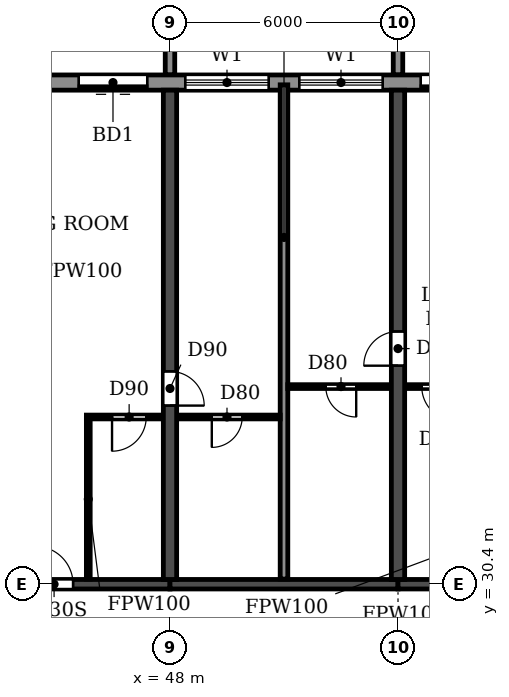
"""IFC4 building model, lengths in metres.
Left out: names, types, materials, properties, quantities, classifications, styles, units other than length and angle.
Written with IfcOpenShell. Run it as: python <this file> out.ifc"""

import sys

from ifc_helpers import new_model, si_unit, direction, frame, frame_2d, origin, place, context, subcontext, project, spatial, polyline, rectangle, outline, extrude, source, transform, mapped, element, fill, save


model = new_model("IFC4")
c1 = context("Model", 3, precision=1e-05, world=origin(), true_north=direction((0.0, 1.0)))
c2 = subcontext(c1, "Body", "Model", "MODEL_VIEW")
j1 = project(units=[si_unit("LENGTHUNIT", "METRE"), si_unit("PLANEANGLEUNIT", "RADIAN")], contexts=[c1])
p1 = place(None, origin())
s1 = spatial("IfcSite", under=j1, at=p1, CompositionType="ELEMENT")
p2 = place(p1, origin())
s2 = spatial("IfcBuilding", under=s1, at=p2, CompositionType="ELEMENT")
p3 = place(p2, frame((0.0, 0.0, 102.6)))
s3 = spatial("IfcBuildingStorey", under=s2, at=p3, CompositionType="ELEMENT", Elevation=102.6)
p4 = place(p3, frame((48.0, 30.525, 0.0), z_axis=(0.0, 0.0, 1.0), x_axis=(0.0, 1.0, 0.0)))
e1 = element("IfcWall", 1, at=p4, inside=s3, PredefinedType="SHEAR", context=c2, shape_type="SweptSolid", body=[
    extrude(rectangle(XDim=12.875, YDim=0.35, at=frame_2d((6.438, 0.0))), origin(), (0.0, 0.0, 1.0), 3.0),
])
p5 = place(p4, frame((4.575, 0.0, 0.0)))
e2 = element("IfcOpeningElement", 2, at=p5, cuts=e1, PredefinedType="OPENING", context=c2, shape_type="SweptSolid", body=[
    extrude(rectangle(XDim=0.9, YDim=2.1, at=frame_2d((0.45, 1.05))), frame((0.0, 0.185, 0.0), z_axis=(0.0, -1.0, 0.0), x_axis=(1.0, 0.0, 0.0)), (0.0, 0.0, 1.0), 0.37),
])
p6 = place(p3, frame((54.0, 30.525, 0.0), z_axis=(0.0, 0.0, 1.0), x_axis=(0.0, 1.0, 0.0)))
e3 = element("IfcWall", 3, at=p6, inside=s3, PredefinedType="SHEAR", context=c2, shape_type="SweptSolid", body=[
    extrude(rectangle(XDim=12.875, YDim=0.35, at=frame_2d((6.438, 0.0))), origin(), (0.0, 0.0, 1.0), 3.0),
])
p7 = place(p6, frame((5.625, 0.0, 0.0)))
e4 = element("IfcOpeningElement", 4, at=p7, cuts=e3, PredefinedType="OPENING", context=c2, shape_type="SweptSolid", body=[
    extrude(rectangle(XDim=0.9, YDim=2.1, at=frame_2d((0.45, 1.05))), frame((0.0, 0.185, 0.0), z_axis=(0.0, -1.0, 0.0), x_axis=(1.0, 0.0, 0.0)), (0.0, 0.0, 1.0), 0.37),
])
p8 = place(p3, frame((42.0, 30.4, 0.0), z_axis=(0.0, 0.0, 1.0), x_axis=(1.0, 0.0, 0.0)))
e5 = element("IfcWall", 5, at=p8, inside=s3, PredefinedType="SHEAR", context=c2, shape_type="SweptSolid", body=[
    extrude(rectangle(XDim=6.0, YDim=0.25, at=frame_2d((3.0, 0.0))), origin(), (0.0, 0.0, 1.0), 2.4),
])
p9 = place(p8, frame((2.45, 0.0, 0.0)))
e6 = element("IfcOpeningElement", 6, at=p9, cuts=e5, PredefinedType="OPENING", context=c2, shape_type="SweptSolid", body=[
    extrude(rectangle(XDim=1.0, YDim=2.1, at=frame_2d((0.5, 1.05))), frame((0.0, 0.135, 0.0), z_axis=(0.0, -1.0, 0.0), x_axis=(1.0, 0.0, 0.0)), (0.0, 0.0, 1.0), 0.27),
])
p10 = place(p3, frame((48.0, 30.4, 0.0), z_axis=(0.0, 0.0, 1.0), x_axis=(1.0, 0.0, 0.0)))
e7 = element("IfcWall", 7, at=p10, inside=s3, PredefinedType="SHEAR", context=c2, shape_type="SweptSolid", body=[
    extrude(rectangle(XDim=6.0, YDim=0.25, at=frame_2d((3.0, 0.0))), origin(), (0.0, 0.0, 1.0), 2.4),
])
p11 = place(p3, frame((54.0, 30.4, 0.0), z_axis=(0.0, 0.0, 1.0), x_axis=(1.0, 0.0, 0.0)))
e8 = element("IfcWall", 8, at=p11, inside=s3, PredefinedType="SHEAR", context=c2, shape_type="SweptSolid", body=[
    extrude(rectangle(XDim=6.0, YDim=0.25, at=frame_2d((3.0, 0.0))), origin(), (0.0, 0.0, 1.0), 2.4),
])
p12 = place(p11, frame((2.55, 0.0, 0.0)))
e9 = element("IfcOpeningElement", 9, at=p12, cuts=e8, PredefinedType="OPENING", context=c2, shape_type="SweptSolid", body=[
    extrude(rectangle(XDim=1.0, YDim=2.1, at=frame_2d((0.5, 1.05))), frame((0.0, 0.135, 0.0), z_axis=(0.0, -1.0, 0.0), x_axis=(1.0, 0.0, 0.0)), (0.0, 0.0, 1.0), 0.27),
])
p13 = place(p3, frame((91.317, 43.6, 0.0), z_axis=(0.0, 0.0, 1.0), x_axis=(-1.0, 0.0, 0.0)))
e10 = element("IfcWall", 10, at=p13, inside=s3, PredefinedType="STANDARD", context=c2, shape_type="SweptSolid", body=[
    extrude(rectangle(XDim=80.634, YDim=0.4, at=frame_2d((40.317, 0.0))), origin(), (0.0, 0.0, 1.0), 3.0),
])
p14 = place(p13, frame((76.717, 0.0, 0.9)))
e11 = element("IfcOpeningElement", 11, at=p14, cuts=e10, PredefinedType="OPENING", context=c2, shape_type="SweptSolid", body=[
    extrude(rectangle(XDim=2.2, YDim=1.5, at=frame_2d((1.1, 0.75))), frame((0.0, 0.21, 0.0), z_axis=(0.0, -1.0, 0.0), x_axis=(1.0, 0.0, 0.0)), (0.0, 0.0, 1.0), 0.42),
])
p15 = place(p13, frame((73.917, 0.0, 0.0)))
e12 = element("IfcOpeningElement", 12, at=p15, cuts=e10, PredefinedType="OPENING", context=c2, shape_type="SweptSolid", body=[
    extrude(rectangle(XDim=1.8, YDim=2.4, at=frame_2d((0.9, 1.2))), frame((0.0, 0.21, 0.0), z_axis=(0.0, -1.0, 0.0), x_axis=(1.0, 0.0, 0.0)), (0.0, 0.0, 1.0), 0.42),
])
p16 = place(p13, frame((70.717, 0.0, 0.9)))
e13 = element("IfcOpeningElement", 13, at=p16, cuts=e10, PredefinedType="OPENING", context=c2, shape_type="SweptSolid", body=[
    extrude(rectangle(XDim=2.2, YDim=1.5, at=frame_2d((1.1, 0.75))), frame((0.0, 0.21, 0.0), z_axis=(0.0, -1.0, 0.0), x_axis=(1.0, 0.0, 0.0)), (0.0, 0.0, 1.0), 0.42),
])
p17 = place(p13, frame((67.717, 0.0, 0.9)))
e14 = element("IfcOpeningElement", 14, at=p17, cuts=e10, PredefinedType="OPENING", context=c2, shape_type="SweptSolid", body=[
    extrude(rectangle(XDim=2.2, YDim=1.5, at=frame_2d((1.1, 0.75))), frame((0.0, 0.21, 0.0), z_axis=(0.0, -1.0, 0.0), x_axis=(1.0, 0.0, 0.0)), (0.0, 0.0, 1.0), 0.42),
])
p18 = place(p13, frame((64.917, 0.0, 0.0)))
e15 = element("IfcOpeningElement", 15, at=p18, cuts=e10, PredefinedType="OPENING", context=c2, shape_type="SweptSolid", body=[
    extrude(rectangle(XDim=1.8, YDim=2.4, at=frame_2d((0.9, 1.2))), frame((0.0, 0.21, 0.0), z_axis=(0.0, -1.0, 0.0), x_axis=(1.0, 0.0, 0.0)), (0.0, 0.0, 1.0), 0.42),
])
p19 = place(p13, frame((61.717, 0.0, 0.9)))
e16 = element("IfcOpeningElement", 16, at=p19, cuts=e10, PredefinedType="OPENING", context=c2, shape_type="SweptSolid", body=[
    extrude(rectangle(XDim=2.2, YDim=1.5, at=frame_2d((1.1, 0.75))), frame((0.0, 0.21, 0.0), z_axis=(0.0, -1.0, 0.0), x_axis=(1.0, 0.0, 0.0)), (0.0, 0.0, 1.0), 0.42),
])
p20 = place(p13, frame((58.717, 0.0, 0.9)))
e17 = element("IfcOpeningElement", 17, at=p20, cuts=e10, PredefinedType="OPENING", context=c2, shape_type="SweptSolid", body=[
    extrude(rectangle(XDim=2.2, YDim=1.5, at=frame_2d((1.1, 0.75))), frame((0.0, 0.21, 0.0), z_axis=(0.0, -1.0, 0.0), x_axis=(1.0, 0.0, 0.0)), (0.0, 0.0, 1.0), 0.42),
])
p21 = place(p13, frame((55.717, 0.0, 0.9)))
e18 = element("IfcOpeningElement", 18, at=p21, cuts=e10, PredefinedType="OPENING", context=c2, shape_type="SweptSolid", body=[
    extrude(rectangle(XDim=2.2, YDim=1.5, at=frame_2d((1.1, 0.75))), frame((0.0, 0.21, 0.0), z_axis=(0.0, -1.0, 0.0), x_axis=(1.0, 0.0, 0.0)), (0.0, 0.0, 1.0), 0.42),
])
p22 = place(p13, frame((52.717, 0.0, 0.9)))
e19 = element("IfcOpeningElement", 19, at=p22, cuts=e10, PredefinedType="OPENING", context=c2, shape_type="SweptSolid", body=[
    extrude(rectangle(XDim=2.2, YDim=1.5, at=frame_2d((1.1, 0.75))), frame((0.0, 0.21, 0.0), z_axis=(0.0, -1.0, 0.0), x_axis=(1.0, 0.0, 0.0)), (0.0, 0.0, 1.0), 0.42),
])
p23 = place(p13, frame((49.917, 0.0, 0.0)))
e20 = element("IfcOpeningElement", 20, at=p23, cuts=e10, PredefinedType="OPENING", context=c2, shape_type="SweptSolid", body=[
    extrude(rectangle(XDim=1.8, YDim=2.4, at=frame_2d((0.9, 1.2))), frame((0.0, 0.21, 0.0), z_axis=(0.0, -1.0, 0.0), x_axis=(1.0, 0.0, 0.0)), (0.0, 0.0, 1.0), 0.42),
])
p24 = place(p13, frame((46.717, 0.0, 0.9)))
e21 = element("IfcOpeningElement", 21, at=p24, cuts=e10, PredefinedType="OPENING", context=c2, shape_type="SweptSolid", body=[
    extrude(rectangle(XDim=2.2, YDim=1.5, at=frame_2d((1.1, 0.75))), frame((0.0, 0.21, 0.0), z_axis=(0.0, -1.0, 0.0), x_axis=(1.0, 0.0, 0.0)), (0.0, 0.0, 1.0), 0.42),
])
p25 = place(p13, frame((43.917, 0.0, 0.0)))
e22 = element("IfcOpeningElement", 22, at=p25, cuts=e10, PredefinedType="OPENING", context=c2, shape_type="SweptSolid", body=[
    extrude(rectangle(XDim=1.8, YDim=2.4, at=frame_2d((0.9, 1.2))), frame((0.0, 0.21, 0.0), z_axis=(0.0, -1.0, 0.0), x_axis=(1.0, 0.0, 0.0)), (0.0, 0.0, 1.0), 0.42),
])
p26 = place(p13, frame((40.717, 0.0, 0.9)))
e23 = element("IfcOpeningElement", 23, at=p26, cuts=e10, PredefinedType="OPENING", context=c2, shape_type="SweptSolid", body=[
    extrude(rectangle(XDim=2.2, YDim=1.5, at=frame_2d((1.1, 0.75))), frame((0.0, 0.21, 0.0), z_axis=(0.0, -1.0, 0.0), x_axis=(1.0, 0.0, 0.0)), (0.0, 0.0, 1.0), 0.42),
])
p27 = place(p13, frame((37.717, 0.0, 0.9)))
e24 = element("IfcOpeningElement", 24, at=p27, cuts=e10, PredefinedType="OPENING", context=c2, shape_type="SweptSolid", body=[
    extrude(rectangle(XDim=2.2, YDim=1.5, at=frame_2d((1.1, 0.75))), frame((0.0, 0.21, 0.0), z_axis=(0.0, -1.0, 0.0), x_axis=(1.0, 0.0, 0.0)), (0.0, 0.0, 1.0), 0.42),
])
p28 = place(p13, frame((34.917, 0.0, 0.0)))
e25 = element("IfcOpeningElement", 25, at=p28, cuts=e10, PredefinedType="OPENING", context=c2, shape_type="SweptSolid", body=[
    extrude(rectangle(XDim=1.8, YDim=2.4, at=frame_2d((0.9, 1.2))), frame((0.0, 0.21, 0.0), z_axis=(0.0, -1.0, 0.0), x_axis=(1.0, 0.0, 0.0)), (0.0, 0.0, 1.0), 0.42),
])
p29 = place(p13, frame((31.717, 0.0, 0.9)))
e26 = element("IfcOpeningElement", 26, at=p29, cuts=e10, PredefinedType="OPENING", context=c2, shape_type="SweptSolid", body=[
    extrude(rectangle(XDim=2.2, YDim=1.5, at=frame_2d((1.1, 0.75))), frame((0.0, 0.21, 0.0), z_axis=(0.0, -1.0, 0.0), x_axis=(1.0, 0.0, 0.0)), (0.0, 0.0, 1.0), 0.42),
])
p30 = place(p13, frame((28.717, 0.0, 0.9)))
e27 = element("IfcOpeningElement", 27, at=p30, cuts=e10, PredefinedType="OPENING", context=c2, shape_type="SweptSolid", body=[
    extrude(rectangle(XDim=2.2, YDim=1.5, at=frame_2d((1.1, 0.75))), frame((0.0, 0.21, 0.0), z_axis=(0.0, -1.0, 0.0), x_axis=(1.0, 0.0, 0.0)), (0.0, 0.0, 1.0), 0.42),
])
p31 = place(p13, frame((25.917, 0.0, 0.0)))
e28 = element("IfcOpeningElement", 28, at=p31, cuts=e10, PredefinedType="OPENING", context=c2, shape_type="SweptSolid", body=[
    extrude(rectangle(XDim=1.8, YDim=2.4, at=frame_2d((0.9, 1.2))), frame((0.0, 0.21, 0.0), z_axis=(0.0, -1.0, 0.0), x_axis=(1.0, 0.0, 0.0)), (0.0, 0.0, 1.0), 0.42),
])
p32 = place(p13, frame((22.717, 0.0, 0.9)))
e29 = element("IfcOpeningElement", 29, at=p32, cuts=e10, PredefinedType="OPENING", context=c2, shape_type="SweptSolid", body=[
    extrude(rectangle(XDim=2.2, YDim=1.5, at=frame_2d((1.1, 0.75))), frame((0.0, 0.21, 0.0), z_axis=(0.0, -1.0, 0.0), x_axis=(1.0, 0.0, 0.0)), (0.0, 0.0, 1.0), 0.42),
])
p33 = place(p13, frame((19.717, 0.0, 0.9)))
e30 = element("IfcOpeningElement", 30, at=p33, cuts=e10, PredefinedType="OPENING", context=c2, shape_type="SweptSolid", body=[
    extrude(rectangle(XDim=2.2, YDim=1.5, at=frame_2d((1.1, 0.75))), frame((0.0, 0.21, 0.0), z_axis=(0.0, -1.0, 0.0), x_axis=(1.0, 0.0, 0.0)), (0.0, 0.0, 1.0), 0.42),
])
p34 = place(p13, frame((16.917, 0.0, 0.0)))
e31 = element("IfcOpeningElement", 31, at=p34, cuts=e10, PredefinedType="OPENING", context=c2, shape_type="SweptSolid", body=[
    extrude(rectangle(XDim=1.8, YDim=2.4, at=frame_2d((0.9, 1.2))), frame((0.0, 0.21, 0.0), z_axis=(0.0, -1.0, 0.0), x_axis=(1.0, 0.0, 0.0)), (0.0, 0.0, 1.0), 0.42),
])
p35 = place(p13, frame((13.717, 0.0, 0.9)))
e32 = element("IfcOpeningElement", 32, at=p35, cuts=e10, PredefinedType="OPENING", context=c2, shape_type="SweptSolid", body=[
    extrude(rectangle(XDim=2.2, YDim=1.5, at=frame_2d((1.1, 0.75))), frame((0.0, 0.21, 0.0), z_axis=(0.0, -1.0, 0.0), x_axis=(1.0, 0.0, 0.0)), (0.0, 0.0, 1.0), 0.42),
])
p36 = place(p13, frame((10.917, 0.0, 0.0)))
e33 = element("IfcOpeningElement", 33, at=p36, cuts=e10, PredefinedType="OPENING", context=c2, shape_type="SweptSolid", body=[
    extrude(rectangle(XDim=1.8, YDim=2.4, at=frame_2d((0.9, 1.2))), frame((0.0, 0.21, 0.0), z_axis=(0.0, -1.0, 0.0), x_axis=(1.0, 0.0, 0.0)), (0.0, 0.0, 1.0), 0.42),
])
p37 = place(p13, frame((7.717, 0.0, 0.9)))
e34 = element("IfcOpeningElement", 34, at=p37, cuts=e10, PredefinedType="OPENING", context=c2, shape_type="SweptSolid", body=[
    extrude(rectangle(XDim=2.2, YDim=1.5, at=frame_2d((1.1, 0.75))), frame((0.0, 0.21, 0.0), z_axis=(0.0, -1.0, 0.0), x_axis=(1.0, 0.0, 0.0)), (0.0, 0.0, 1.0), 0.42),
])
p38 = place(p13, frame((4.717, 0.0, 0.9)))
e35 = element("IfcOpeningElement", 35, at=p38, cuts=e10, PredefinedType="OPENING", context=c2, shape_type="SweptSolid", body=[
    extrude(rectangle(XDim=2.2, YDim=1.5, at=frame_2d((1.1, 0.75))), frame((0.0, 0.21, 0.0), z_axis=(0.0, -1.0, 0.0), x_axis=(1.0, 0.0, 0.0)), (0.0, 0.0, 1.0), 0.42),
])
p39 = place(p13, frame((1.917, 0.0, 0.0)))
e36 = element("IfcOpeningElement", 36, at=p39, cuts=e10, PredefinedType="OPENING", context=c2, shape_type="SweptSolid", body=[
    extrude(rectangle(XDim=1.8, YDim=2.4, at=frame_2d((0.9, 1.2))), frame((0.0, 0.21, 0.0), z_axis=(0.0, -1.0, 0.0), x_axis=(1.0, 0.0, 0.0)), (0.0, 0.0, 1.0), 0.42),
])
m1 = source(origin(), c2, "Body", "SweptSolid", [
    extrude(outline(polyline([(0.0, 0.0), (0.25, 0.0), (0.25, 3.1), (0.0, 3.1), (0.0, 0.0)])), origin(), (0.0, 0.0, 1.0), 3.1),
])
for number, where in (
    (37, (47.875, 43.8, 0.0)),
    (38, (53.875, 43.8, 0.0)),
):
    element("IfcWall", number, at=place(p3, frame(where)), inside=s3, PredefinedType="STANDARD", context=c2, shape_type="MappedRepresentation", body=[
        mapped(m1, transform((0.0, 0.0, 0.0))),
    ])
p40 = place(p3, frame((51.0, 30.535, 0.0), z_axis=(0.0, 0.0, 1.0), x_axis=(0.0, 1.0, 0.0)))
e39 = element("IfcWall", 39, at=p40, inside=s3, PredefinedType="PARTITIONING", context=c2, shape_type="SweptSolid", body=[
    extrude(rectangle(XDim=13.005, YDim=0.2, at=frame_2d((6.502, 0.0))), origin(), (0.0, 0.0, 1.0), 3.0),
])
p41 = place(p3, frame((45.8, 34.8, 0.0), z_axis=(0.0, 0.0, 1.0), x_axis=(1.0, 0.0, 0.0)))
e40 = element("IfcWall", 40, at=p41, inside=s3, PredefinedType="PARTITIONING", context=c2, shape_type="SweptSolid", body=[
    extrude(rectangle(XDim=2.015, YDim=0.1, at=frame_2d((1.007, 0.0))), origin(), (0.0, 0.0, 1.0), 3.0),
])
p42 = place(p41, frame((0.675, 0.0, 0.0)))
e41 = element("IfcOpeningElement", 41, at=p42, cuts=e40, PredefinedType="OPENING", context=c2, shape_type="SweptSolid", body=[
    extrude(rectangle(XDim=0.9, YDim=2.1, at=frame_2d((0.45, 1.05))), frame((0.0, 0.06, 0.0), z_axis=(0.0, -1.0, 0.0), x_axis=(1.0, 0.0, 0.0)), (0.0, 0.0, 1.0), 0.12),
])
p43 = place(p3, frame((48.185, 34.8, 0.0), z_axis=(0.0, 0.0, 1.0), x_axis=(1.0, 0.0, 0.0)))
e42 = element("IfcWall", 42, at=p43, inside=s3, PredefinedType="PARTITIONING", context=c2, shape_type="SweptSolid", body=[
    extrude(rectangle(XDim=2.715, YDim=0.1, at=frame_2d((1.357, 0.0))), origin(), (0.0, 0.0, 1.0), 3.0),
])
p44 = place(p43, frame((0.915, 0.0, 0.0)))
e43 = element("IfcOpeningElement", 43, at=p44, cuts=e42, PredefinedType="OPENING", context=c2, shape_type="SweptSolid", body=[
    extrude(rectangle(XDim=0.8, YDim=2.1, at=frame_2d((0.4, 1.05))), frame((0.0, 0.06, 0.0), z_axis=(0.0, -1.0, 0.0), x_axis=(1.0, 0.0, 0.0)), (0.0, 0.0, 1.0), 0.12),
])
p45 = place(p3, frame((51.1, 35.6, 0.0), z_axis=(0.0, 0.0, 1.0), x_axis=(1.0, 0.0, 0.0)))
e44 = element("IfcWall", 44, at=p45, inside=s3, PredefinedType="PARTITIONING", context=c2, shape_type="SweptSolid", body=[
    extrude(rectangle(XDim=2.715, YDim=0.1, at=frame_2d((1.357, 0.0))), origin(), (0.0, 0.0, 1.0), 3.0),
])
p46 = place(p45, frame((1.0, 0.0, 0.0)))
e45 = element("IfcOpeningElement", 45, at=p46, cuts=e44, PredefinedType="OPENING", context=c2, shape_type="SweptSolid", body=[
    extrude(rectangle(XDim=0.8, YDim=2.1, at=frame_2d((0.4, 1.05))), frame((0.0, 0.06, 0.0), z_axis=(0.0, -1.0, 0.0), x_axis=(1.0, 0.0, 0.0)), (0.0, 0.0, 1.0), 0.12),
])
p47 = place(p3, frame((54.185, 35.6, 0.0), z_axis=(0.0, 0.0, 1.0), x_axis=(1.0, 0.0, 0.0)))
e46 = element("IfcWall", 46, at=p47, inside=s3, PredefinedType="PARTITIONING", context=c2, shape_type="SweptSolid", body=[
    extrude(rectangle(XDim=2.015, YDim=0.1, at=frame_2d((1.007, 0.0))), origin(), (0.0, 0.0, 1.0), 3.0),
])
p48 = place(p47, frame((0.44, 0.0, 0.0)))
e47 = element("IfcOpeningElement", 47, at=p48, cuts=e46, PredefinedType="OPENING", context=c2, shape_type="SweptSolid", body=[
    extrude(rectangle(XDim=0.9, YDim=2.1, at=frame_2d((0.45, 1.05))), frame((0.0, 0.06, 0.0), z_axis=(0.0, -1.0, 0.0), x_axis=(1.0, 0.0, 0.0)), (0.0, 0.0, 1.0), 0.12),
])
p49 = place(p3, frame((45.85, 30.535, 0.0), z_axis=(0.0, 0.0, 1.0), x_axis=(0.0, 1.0, 0.0)))
e48 = element("IfcWall", 48, at=p49, inside=s3, PredefinedType="PARTITIONING", context=c2, shape_type="SweptSolid", body=[
    extrude(rectangle(XDim=4.215, YDim=0.1, at=frame_2d((2.107, 0.0))), origin(), (0.0, 0.0, 1.0), 3.0),
])
p50 = place(p25, origin())
e49 = element("IfcDoor", 49, at=p50, inside=s3, OperationType="DOUBLE_DOOR_SLIDING", PredefinedType="DOOR", context=c2, shape_type="SweptSolid", body=[
    extrude(rectangle(XDim=1.8, YDim=2.4, at=frame_2d((0.9, 1.2))), frame((0.0, 0.025, 0.0), z_axis=(0.0, -1.0, 0.0), x_axis=(1.0, 0.0, 0.0)), (0.0, 0.0, 1.0), 0.05),
])
fill(e22, e49)
p51 = place(p26, origin())
e50 = element("IfcWindow", 50, at=p51, inside=s3, PartitioningType="DOUBLE_PANEL_HORIZONTAL", PredefinedType="WINDOW", context=c2, shape_type="SweptSolid", body=[
    extrude(rectangle(XDim=2.2, YDim=1.5, at=frame_2d((1.1, 0.75))), frame((0.0, 0.03, 0.0), z_axis=(0.0, -1.0, 0.0), x_axis=(1.0, 0.0, 0.0)), (0.0, 0.0, 1.0), 0.06),
])
fill(e23, e50)
p52 = place(p27, origin())
e51 = element("IfcWindow", 51, at=p52, inside=s3, PartitioningType="DOUBLE_PANEL_HORIZONTAL", PredefinedType="WINDOW", context=c2, shape_type="SweptSolid", body=[
    extrude(rectangle(XDim=2.2, YDim=1.5, at=frame_2d((1.1, 0.75))), frame((0.0, 0.03, 0.0), z_axis=(0.0, -1.0, 0.0), x_axis=(1.0, 0.0, 0.0)), (0.0, 0.0, 1.0), 0.06),
])
fill(e24, e51)
p53 = place(p28, origin())
e52 = element("IfcDoor", 52, at=p53, inside=s3, OperationType="DOUBLE_DOOR_SLIDING", PredefinedType="DOOR", context=c2, shape_type="SweptSolid", body=[
    extrude(rectangle(XDim=1.8, YDim=2.4, at=frame_2d((0.9, 1.2))), frame((0.0, 0.025, 0.0), z_axis=(0.0, -1.0, 0.0), x_axis=(1.0, 0.0, 0.0)), (0.0, 0.0, 1.0), 0.05),
])
fill(e25, e52)
p54 = place(p44, frame((0.8, 0.0, 0.0), z_axis=(0.0, 0.0, 1.0), x_axis=(-1.0, 0.0, 0.0)))
e53 = element("IfcDoor", 53, at=p54, inside=s3, OperationType="SINGLE_SWING_RIGHT", PredefinedType="DOOR", context=c2, shape_type="SweptSolid", body=[
    extrude(rectangle(XDim=0.8, YDim=2.1, at=frame_2d((0.4, 1.05))), frame((0.0, 0.025, 0.0), z_axis=(0.0, -1.0, 0.0), x_axis=(1.0, 0.0, 0.0)), (0.0, 0.0, 1.0), 0.05),
])
fill(e43, e53)
p55 = place(p9, origin())
e54 = element("IfcDoor", 54, at=p55, inside=s3, OperationType="SINGLE_SWING_LEFT", PredefinedType="DOOR", context=c2, shape_type="SweptSolid", body=[
    extrude(rectangle(XDim=1.0, YDim=2.1, at=frame_2d((0.5, 1.05))), frame((0.0, 0.025, 0.0), z_axis=(0.0, -1.0, 0.0), x_axis=(1.0, 0.0, 0.0)), (0.0, 0.0, 1.0), 0.05),
])
fill(e6, e54)
p56 = place(p42, frame((0.9, 0.0, 0.0), z_axis=(0.0, 0.0, 1.0), x_axis=(-1.0, 0.0, 0.0)))
e55 = element("IfcDoor", 55, at=p56, inside=s3, OperationType="SINGLE_SWING_RIGHT", PredefinedType="DOOR", context=c2, shape_type="SweptSolid", body=[
    extrude(rectangle(XDim=0.9, YDim=2.1, at=frame_2d((0.45, 1.05))), frame((0.0, 0.025, 0.0), z_axis=(0.0, -1.0, 0.0), x_axis=(1.0, 0.0, 0.0)), (0.0, 0.0, 1.0), 0.05),
])
fill(e41, e55)
p57 = place(p5, frame((0.9, 0.0, 0.0), z_axis=(0.0, 0.0, 1.0), x_axis=(-1.0, 0.0, 0.0)))
e56 = element("IfcDoor", 56, at=p57, inside=s3, OperationType="SINGLE_SWING_RIGHT", PredefinedType="DOOR", context=c2, shape_type="SweptSolid", body=[
    extrude(rectangle(XDim=0.9, YDim=2.1, at=frame_2d((0.45, 1.05))), frame((0.0, 0.025, 0.0), z_axis=(0.0, -1.0, 0.0), x_axis=(1.0, 0.0, 0.0)), (0.0, 0.0, 1.0), 0.05),
])
fill(e2, e56)
p58 = place(p46, frame((0.8, 0.0, 0.0), z_axis=(0.0, 0.0, 1.0), x_axis=(-1.0, 0.0, 0.0)))
e57 = element("IfcDoor", 57, at=p58, inside=s3, OperationType="SINGLE_SWING_LEFT", PredefinedType="DOOR", context=c2, shape_type="SweptSolid", body=[
    extrude(rectangle(XDim=0.8, YDim=2.1, at=frame_2d((0.4, 1.05))), frame((0.0, 0.025, 0.0), z_axis=(0.0, -1.0, 0.0), x_axis=(1.0, 0.0, 0.0)), (0.0, 0.0, 1.0), 0.05),
])
fill(e45, e57)
p59 = place(p7, origin())
e58 = element("IfcDoor", 58, at=p59, inside=s3, OperationType="SINGLE_SWING_LEFT", PredefinedType="DOOR", context=c2, shape_type="SweptSolid", body=[
    extrude(rectangle(XDim=0.9, YDim=2.1, at=frame_2d((0.45, 1.05))), frame((0.0, 0.025, 0.0), z_axis=(0.0, -1.0, 0.0), x_axis=(1.0, 0.0, 0.0)), (0.0, 0.0, 1.0), 0.05),
])
fill(e4, e58)
p60 = place(p48, frame((0.9, 0.0, 0.0), z_axis=(0.0, 0.0, 1.0), x_axis=(-1.0, 0.0, 0.0)))
e59 = element("IfcDoor", 59, at=p60, inside=s3, OperationType="SINGLE_SWING_LEFT", PredefinedType="DOOR", context=c2, shape_type="SweptSolid", body=[
    extrude(rectangle(XDim=0.9, YDim=2.1, at=frame_2d((0.45, 1.05))), frame((0.0, 0.025, 0.0), z_axis=(0.0, -1.0, 0.0), x_axis=(1.0, 0.0, 0.0)), (0.0, 0.0, 1.0), 0.05),
])
fill(e47, e59)
save(model, sys.argv[1])
